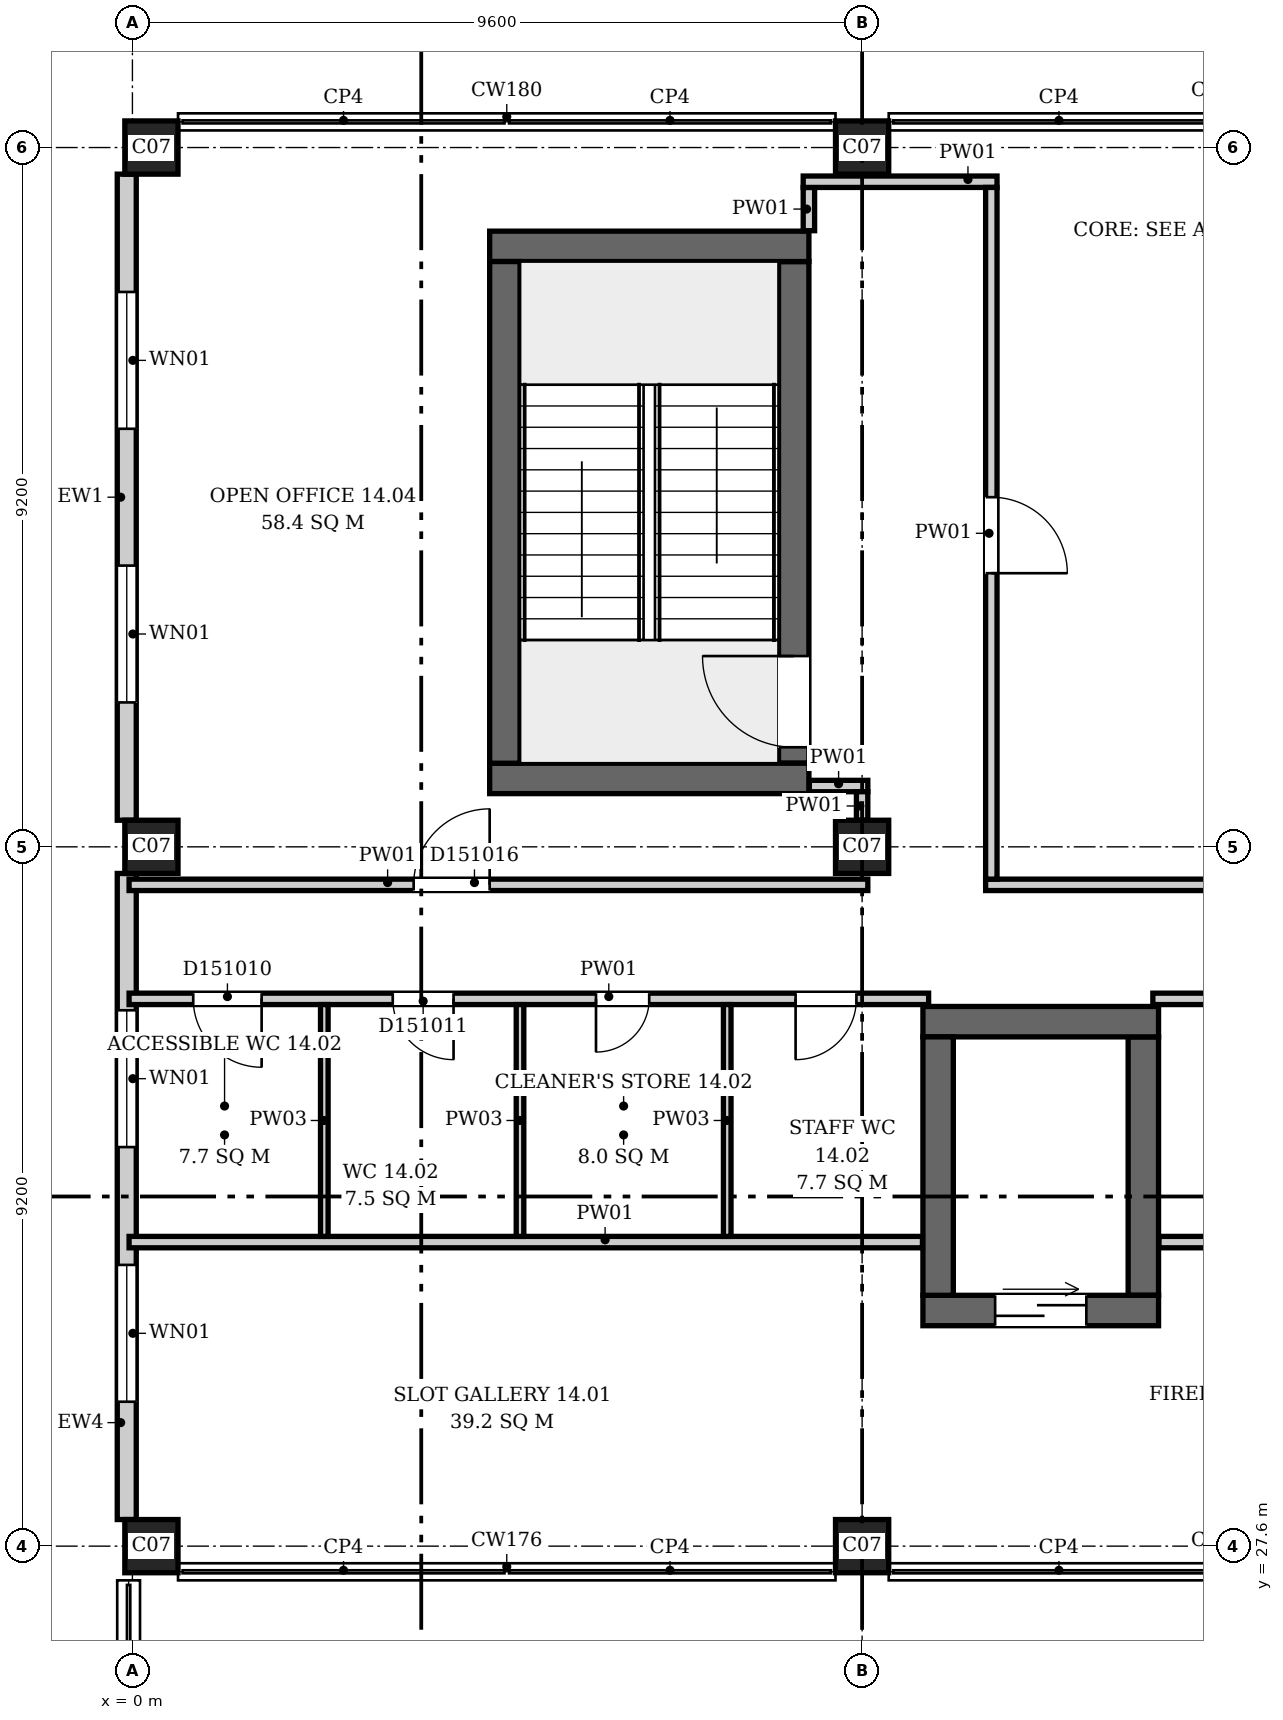
"""IFC4 building model, lengths in metres.
Left out: names, types, materials, properties, quantities, classifications, styles, units other than length and angle.
Written with IfcOpenShell. Run it as: python <this file> out.ifc"""

import sys

from ifc_helpers import new_model, si_unit, direction, frame, frame_2d, origin, origin_2d, place, context, subcontext, project, spatial, rectangle, extrude, element, fill, save


model = new_model("IFC4")
c1 = context("Model", 3, precision=1e-05, world=origin(), true_north=direction((0.0, 1.0)))
c2 = subcontext(c1, "Body", "Model", "MODEL_VIEW")
j1 = project(units=[si_unit("LENGTHUNIT", "METRE"), si_unit("PLANEANGLEUNIT", "RADIAN")], contexts=[c1])
p1 = place(None, origin())
s1 = spatial("IfcSite", under=j1, at=p1, CompositionType="ELEMENT")
p2 = place(p1, origin())
s2 = spatial("IfcBuilding", under=s1, at=p2, CompositionType="ELEMENT")
p3 = place(p2, frame((0.0, 0.0, 69.7)))
s3 = spatial("IfcBuildingStorey", under=s2, at=p3, CompositionType="ELEMENT", Elevation=69.7)
for number, where, z_axis, x_axis in (
    (1, (4.7, 37.7, 0.0), (0.0, 0.0, 1.0), (1.0, 0.0, 0.0)),
    (2, (4.7, 44.7, 0.0), (0.0, 0.0, 1.0), (1.0, 0.0, 0.0)),
):
    element("IfcWall", number, at=place(p3, frame(where, z_axis=z_axis, x_axis=x_axis)), inside=s3, PredefinedType="SHEAR", context=c2, shape_type="SweptSolid", body=[
        extrude(rectangle(XDim=4.2, YDim=0.4, at=frame_2d((2.1, 0.0))), origin(), (0.0, 0.0, 1.0), 4.2),
    ])
p4 = place(p3, frame((4.9, 37.9, 0.0), z_axis=(0.0, 0.0, 1.0), x_axis=(0.0, 1.0, 0.0)))
e3 = element("IfcWall", 3, at=p4, inside=s3, PredefinedType="SHEAR", context=c2, shape_type="SweptSolid", body=[
    extrude(rectangle(XDim=6.6, YDim=0.4, at=frame_2d((3.3, 0.0))), origin(), (0.0, 0.0, 1.0), 4.2),
])
p5 = place(p3, frame((8.7, 37.9, 0.0), z_axis=(0.0, 0.0, 1.0), x_axis=(0.0, 1.0, 0.0)))
e4 = element("IfcWall", 4, at=p5, inside=s3, PredefinedType="SHEAR", context=c2, shape_type="SweptSolid", body=[
    extrude(rectangle(XDim=6.6, YDim=0.4, at=frame_2d((3.3, 0.0))), origin(), (0.0, 0.0, 1.0), 4.2),
])
p6 = place(p5, frame((0.21, 0.0, 0.0)))
e5 = element("IfcOpeningElement", 5, at=p6, cuts=e4, PredefinedType="OPENING", context=c2, shape_type="SweptSolid", body=[
    extrude(rectangle(XDim=1.2, YDim=2.1, at=frame_2d((0.6, 1.05))), frame((0.0, 0.21, 0.0), z_axis=(0.0, -1.0, 0.0), x_axis=(1.0, 0.0, 0.0)), (0.0, 0.0, 1.0), 0.42),
])
p7 = place(p3, frame((10.4, 30.7, 0.0), z_axis=(0.0, 0.0, 1.0), x_axis=(1.0, 0.0, 0.0)))
e6 = element("IfcWall", 6, at=p7, inside=s3, PredefinedType="SHEAR", context=c2, shape_type="SweptSolid", body=[
    extrude(rectangle(XDim=3.1, YDim=0.4, at=frame_2d((1.55, 0.0))), origin(), (0.0, 0.0, 1.0), 4.2),
])
p8 = place(p7, frame((0.95, 0.0, 0.0)))
e7 = element("IfcOpeningElement", 7, at=p8, cuts=e6, PredefinedType="OPENING", context=c2, shape_type="SweptSolid", body=[
    extrude(rectangle(XDim=1.2, YDim=2.1, at=frame_2d((0.6, 1.05))), frame((0.0, 0.21, 0.0), z_axis=(0.0, -1.0, 0.0), x_axis=(1.0, 0.0, 0.0)), (0.0, 0.0, 1.0), 0.42),
])
p9 = place(p3, frame((10.4, 34.5, 0.0), z_axis=(0.0, 0.0, 1.0), x_axis=(1.0, 0.0, 0.0)))
e8 = element("IfcWall", 8, at=p9, inside=s3, PredefinedType="SHEAR", context=c2, shape_type="SweptSolid", body=[
    extrude(rectangle(XDim=3.1, YDim=0.4, at=frame_2d((1.55, 0.0))), origin(), (0.0, 0.0, 1.0), 4.2),
])
for number, where, z_axis, x_axis in (
    (9, (10.6, 30.9, 0.0), (0.0, 0.0, 1.0), (0.0, 1.0, 0.0)),
    (10, (13.3, 30.9, 0.0), (0.0, 0.0, 1.0), (0.0, 1.0, 0.0)),
):
    element("IfcWall", number, at=place(p3, frame(where, z_axis=z_axis, x_axis=x_axis)), inside=s3, PredefinedType="SHEAR", context=c2, shape_type="SweptSolid", body=[
        extrude(rectangle(XDim=3.4, YDim=0.4, at=frame_2d((1.7, 0.0))), origin(), (0.0, 0.0, 1.0), 4.2),
    ])
for number, where, z_axis, x_axis in (
    (11, (0.25, 27.6, 0.0), (0.0, 0.0, 1.0), (1.0, 0.0, 0.0)),
    (12, (9.6, 27.6, 0.0), (0.0, 0.0, 1.0), (1.0, 0.0, 0.0)),
    (13, (0.25, 36.8, 0.0), (0.0, 0.0, 1.0), (1.0, 0.0, 0.0)),
    (14, (9.6, 36.8, 0.0), (0.0, 0.0, 1.0), (1.0, 0.0, 0.0)),
    (15, (0.25, 46.0, 0.0), (0.0, 0.0, 1.0), (1.0, 0.0, 0.0)),
    (16, (9.6, 46.0, 0.0), (0.0, 0.0, 1.0), (1.0, 0.0, 0.0)),
):
    element("IfcColumn", number, at=place(p3, frame(where, z_axis=z_axis, x_axis=x_axis)), inside=s3, PredefinedType="COLUMN", context=c2, shape_type="SweptSolid", body=[
        extrude(rectangle(XDim=0.7, YDim=0.7, at=origin_2d()), origin(), (0.0, 0.0, 1.0), 4.2),
    ])
p10 = place(p3, frame((-0.074, 36.45, 0.0), z_axis=(0.0, 0.0, 1.0), x_axis=(0.0, -1.0, 0.0)))
e17 = element("IfcWall", 17, at=p10, inside=s3, PredefinedType="ELEMENTEDWALL", context=c2, shape_type="SweptSolid", body=[
    extrude(rectangle(XDim=8.5, YDim=0.25, at=frame_2d((4.25, 0.0))), origin(), (0.0, 0.0, 1.0), 3.9),
])
p11 = place(p10, frame((5.15, 0.0, 0.9)))
e18 = element("IfcOpeningElement", 18, at=p11, cuts=e17, PredefinedType="OPENING", context=c2, shape_type="SweptSolid", body=[
    extrude(rectangle(XDim=1.8, YDim=2.6, at=frame_2d((0.9, 1.3))), frame((0.0, 0.135, 0.0), z_axis=(0.0, -1.0, 0.0), x_axis=(1.0, 0.0, 0.0)), (0.0, 0.0, 1.0), 0.27),
])
p12 = place(p10, frame((1.8, 0.0, 0.9)))
e19 = element("IfcOpeningElement", 19, at=p12, cuts=e17, PredefinedType="OPENING", context=c2, shape_type="SweptSolid", body=[
    extrude(rectangle(XDim=1.8, YDim=2.6, at=frame_2d((0.9, 1.3))), frame((0.0, 0.135, 0.0), z_axis=(0.0, -1.0, 0.0), x_axis=(1.0, 0.0, 0.0)), (0.0, 0.0, 1.0), 0.27),
])
p13 = place(p3, frame((-0.074, 45.65, 0.0), z_axis=(0.0, 0.0, 1.0), x_axis=(0.0, -1.0, 0.0)))
e20 = element("IfcWall", 20, at=p13, inside=s3, PredefinedType="ELEMENTEDWALL", context=c2, shape_type="SweptSolid", body=[
    extrude(rectangle(XDim=8.5, YDim=0.25, at=frame_2d((4.25, 0.0))), origin(), (0.0, 0.0, 1.0), 3.9),
])
p14 = place(p13, frame((5.15, 0.0, 0.9)))
e21 = element("IfcOpeningElement", 21, at=p14, cuts=e20, PredefinedType="OPENING", context=c2, shape_type="SweptSolid", body=[
    extrude(rectangle(XDim=1.8, YDim=2.6, at=frame_2d((0.9, 1.3))), frame((0.0, 0.135, 0.0), z_axis=(0.0, -1.0, 0.0), x_axis=(1.0, 0.0, 0.0)), (0.0, 0.0, 1.0), 0.27),
])
p15 = place(p13, frame((1.55, 0.0, 0.9)))
e22 = element("IfcOpeningElement", 22, at=p15, cuts=e20, PredefinedType="OPENING", context=c2, shape_type="SweptSolid", body=[
    extrude(rectangle(XDim=1.8, YDim=2.6, at=frame_2d((0.9, 1.3))), frame((0.0, 0.135, 0.0), z_axis=(0.0, -1.0, 0.0), x_axis=(1.0, 0.0, 0.0)), (0.0, 0.0, 1.0), 0.27),
])
p16 = place(p3, frame((-0.044, 31.6, 0.0), z_axis=(0.0, 0.0, 1.0), x_axis=(1.0, 0.0, 0.0)))
e23 = element("IfcWall", 23, at=p16, inside=s3, PredefinedType="PARTITIONING", context=c2, shape_type="SweptSolid", body=[
    extrude(rectangle(XDim=10.438, YDim=0.15, at=frame_2d((5.219, 0.0))), origin(), (0.0, 0.0, 1.0), 3.9),
])
p17 = place(p3, frame((-0.044, 34.8, 0.0), z_axis=(0.0, 0.0, 1.0), x_axis=(1.0, 0.0, 0.0)))
e24 = element("IfcWall", 24, at=p17, inside=s3, PredefinedType="PARTITIONING", context=c2, shape_type="SweptSolid", body=[
    extrude(rectangle(XDim=10.519, YDim=0.15, at=frame_2d((5.26, 0.0))), origin(), (0.0, 0.0, 1.0), 3.9),
])
p18 = place(p17, frame((0.844, 0.0, 0.0)))
e25 = element("IfcOpeningElement", 25, at=p18, cuts=e24, PredefinedType="OPENING", context=c2, shape_type="SweptSolid", body=[
    extrude(rectangle(XDim=0.9, YDim=2.1, at=frame_2d((0.45, 1.05))), frame((0.0, 0.085, 0.0), z_axis=(0.0, -1.0, 0.0), x_axis=(1.0, 0.0, 0.0)), (0.0, 0.0, 1.0), 0.17),
])
p19 = place(p17, frame((3.469, 0.0, 0.0)))
e26 = element("IfcOpeningElement", 26, at=p19, cuts=e24, PredefinedType="OPENING", context=c2, shape_type="SweptSolid", body=[
    extrude(rectangle(XDim=0.8, YDim=2.1, at=frame_2d((0.4, 1.05))), frame((0.0, 0.085, 0.0), z_axis=(0.0, -1.0, 0.0), x_axis=(1.0, 0.0, 0.0)), (0.0, 0.0, 1.0), 0.17),
])
p20 = place(p17, frame((6.143, 0.0, 0.0)))
e27 = element("IfcOpeningElement", 27, at=p20, cuts=e24, PredefinedType="OPENING", context=c2, shape_type="SweptSolid", body=[
    extrude(rectangle(XDim=0.7, YDim=2.1, at=frame_2d((0.35, 1.05))), frame((0.0, 0.085, 0.0), z_axis=(0.0, -1.0, 0.0), x_axis=(1.0, 0.0, 0.0)), (0.0, 0.0, 1.0), 0.17),
])
p21 = place(p17, frame((8.769, 0.0, 0.0)))
e28 = element("IfcOpeningElement", 28, at=p21, cuts=e24, PredefinedType="OPENING", context=c2, shape_type="SweptSolid", body=[
    extrude(rectangle(XDim=0.8, YDim=2.1, at=frame_2d((0.4, 1.05))), frame((0.0, 0.085, 0.0), z_axis=(0.0, -1.0, 0.0), x_axis=(1.0, 0.0, 0.0)), (0.0, 0.0, 1.0), 0.17),
])
p22 = place(p3, frame((-0.044, 36.3, 0.0), z_axis=(0.0, 0.0, 1.0), x_axis=(1.0, 0.0, 0.0)))
e29 = element("IfcWall", 29, at=p22, inside=s3, PredefinedType="PARTITIONING", context=c2, shape_type="SweptSolid", body=[
    extrude(rectangle(XDim=9.719, YDim=0.15, at=frame_2d((4.859, 0.0))), origin(), (0.0, 0.0, 1.0), 3.9),
])
p23 = place(p22, frame((3.744, 0.0, 0.0)))
e30 = element("IfcOpeningElement", 30, at=p23, cuts=e29, PredefinedType="OPENING", context=c2, shape_type="SweptSolid", body=[
    extrude(rectangle(XDim=1.0, YDim=2.1, at=frame_2d((0.5, 1.05))), frame((0.0, 0.085, 0.0), z_axis=(0.0, -1.0, 0.0), x_axis=(1.0, 0.0, 0.0)), (0.0, 0.0, 1.0), 0.17),
])
for number, where, z_axis, x_axis in (
    (31, (2.525, 31.675, 0.0), (0.0, 0.0, 1.0), (0.0, 1.0, 0.0)),
    (32, (5.099, 31.675, 0.0), (0.0, 0.0, 1.0), (0.0, 1.0, 0.0)),
    (33, (7.825, 31.675, 0.0), (0.0, 0.0, 1.0), (0.0, 1.0, 0.0)),
):
    element("IfcWall", number, at=place(p3, frame(where, z_axis=z_axis, x_axis=x_axis)), inside=s3, PredefinedType="PARTITIONING", context=c2, shape_type="SweptSolid", body=[
        extrude(rectangle(XDim=3.05, YDim=0.1, at=frame_2d((1.525, 0.0))), origin(), (0.0, 0.0, 1.0), 3.9),
    ])
p24 = place(p3, frame((8.9, 44.906, 0.0), z_axis=(0.0, 0.0, 1.0), x_axis=(0.0, 1.0, 0.0)))
e34 = element("IfcWall", 34, at=p24, inside=s3, PredefinedType="PARTITIONING", context=c2, shape_type="SweptSolid", body=[
    extrude(rectangle(XDim=0.569, YDim=0.15, at=frame_2d((0.285, 0.0))), origin(), (0.0, 0.0, 1.0), 3.9),
])
p25 = place(p3, frame((8.825, 45.55, 0.0), z_axis=(0.0, 0.0, 1.0), x_axis=(1.0, 0.0, 0.0)))
e35 = element("IfcWall", 35, at=p25, inside=s3, PredefinedType="PARTITIONING", context=c2, shape_type="SweptSolid", body=[
    extrude(rectangle(XDim=2.55, YDim=0.15, at=frame_2d((1.275, 0.0))), origin(), (0.0, 0.0, 1.0), 3.9),
])
p26 = place(p3, frame((8.906, 37.6, 0.0), z_axis=(0.0, 0.0, 1.0), x_axis=(1.0, 0.0, 0.0)))
e36 = element("IfcWall", 36, at=p26, inside=s3, PredefinedType="PARTITIONING", context=c2, shape_type="SweptSolid", body=[
    extrude(rectangle(XDim=0.769, YDim=0.15, at=frame_2d((0.385, 0.0))), origin(), (0.0, 0.0, 1.0), 3.9),
])
p27 = place(p3, frame((9.6, 37.15, 0.0), z_axis=(0.0, 0.0, 1.0), x_axis=(0.0, 1.0, 0.0)))
e37 = element("IfcWall", 37, at=p27, inside=s3, PredefinedType="PARTITIONING", context=c2, shape_type="SweptSolid", body=[
    extrude(rectangle(XDim=0.375, YDim=0.15, at=frame_2d((0.188, 0.0))), origin(), (0.0, 0.0, 1.0), 3.9),
])
p28 = place(p3, frame((11.225, 36.3, 0.0), z_axis=(0.0, 0.0, 1.0), x_axis=(1.0, 0.0, 0.0)))
e38 = element("IfcWall", 38, at=p28, inside=s3, PredefinedType="PARTITIONING", context=c2, shape_type="SweptSolid", body=[
    extrude(rectangle(XDim=11.05, YDim=0.15, at=frame_2d((5.525, 0.0))), origin(), (0.0, 0.0, 1.0), 3.9),
])
p29 = place(p3, frame((11.3, 36.375, 0.0), z_axis=(0.0, 0.0, 1.0), x_axis=(0.0, 1.0, 0.0)))
e39 = element("IfcWall", 39, at=p29, inside=s3, PredefinedType="PARTITIONING", context=c2, shape_type="SweptSolid", body=[
    extrude(rectangle(XDim=9.1, YDim=0.15, at=frame_2d((4.55, 0.0))), origin(), (0.0, 0.0, 1.0), 3.9),
])
p30 = place(p29, frame((4.025, 0.0, 0.0)))
e40 = element("IfcOpeningElement", 40, at=p30, cuts=e39, PredefinedType="OPENING", context=c2, shape_type="SweptSolid", body=[
    extrude(rectangle(XDim=1.0, YDim=2.1, at=frame_2d((0.5, 1.05))), frame((0.0, 0.085, 0.0), z_axis=(0.0, -1.0, 0.0), x_axis=(1.0, 0.0, 0.0)), (0.0, 0.0, 1.0), 0.17),
])
p31 = place(p3, frame((13.425, 34.8, 0.0), z_axis=(0.0, 0.0, 1.0), x_axis=(1.0, 0.0, 0.0)))
e41 = element("IfcWall", 41, at=p31, inside=s3, PredefinedType="PARTITIONING", context=c2, shape_type="SweptSolid", body=[
    extrude(rectangle(XDim=6.85, YDim=0.15, at=frame_2d((3.425, 0.0))), origin(), (0.0, 0.0, 1.0), 3.9),
])
p32 = place(p31, frame((2.925, 0.0, 0.0)))
e42 = element("IfcOpeningElement", 42, at=p32, cuts=e41, PredefinedType="OPENING", context=c2, shape_type="SweptSolid", body=[
    extrude(rectangle(XDim=1.0, YDim=2.1, at=frame_2d((0.5, 1.05))), frame((0.0, 0.085, 0.0), z_axis=(0.0, -1.0, 0.0), x_axis=(1.0, 0.0, 0.0)), (0.0, 0.0, 1.0), 0.17),
])
p33 = place(p3, frame((13.506, 31.6, 0.0), z_axis=(0.0, 0.0, 1.0), x_axis=(1.0, 0.0, 0.0)))
e43 = element("IfcWall", 43, at=p33, inside=s3, PredefinedType="PARTITIONING", context=c2, shape_type="SweptSolid", body=[
    extrude(rectangle(XDim=6.769, YDim=0.15, at=frame_2d((3.384, 0.0))), origin(), (0.0, 0.0, 1.0), 3.9),
])
p34 = place(p11, origin())
e44 = element("IfcWindow", 44, at=p34, inside=s3, PartitioningType="SINGLE_PANEL", PredefinedType="WINDOW", context=c2, shape_type="SweptSolid", body=[
    extrude(rectangle(XDim=1.8, YDim=2.6, at=frame_2d((0.9, 1.3))), frame((0.0, 0.03, 0.0), z_axis=(0.0, -1.0, 0.0), x_axis=(1.0, 0.0, 0.0)), (0.0, 0.0, 1.0), 0.06),
])
fill(e18, e44)
p35 = place(p12, origin())
e45 = element("IfcWindow", 45, at=p35, inside=s3, PartitioningType="SINGLE_PANEL", PredefinedType="WINDOW", context=c2, shape_type="SweptSolid", body=[
    extrude(rectangle(XDim=1.8, YDim=2.6, at=frame_2d((0.9, 1.3))), frame((0.0, 0.03, 0.0), z_axis=(0.0, -1.0, 0.0), x_axis=(1.0, 0.0, 0.0)), (0.0, 0.0, 1.0), 0.06),
])
fill(e19, e45)
p36 = place(p14, origin())
e46 = element("IfcWindow", 46, at=p36, inside=s3, PartitioningType="SINGLE_PANEL", PredefinedType="WINDOW", context=c2, shape_type="SweptSolid", body=[
    extrude(rectangle(XDim=1.8, YDim=2.6, at=frame_2d((0.9, 1.3))), frame((0.0, 0.03, 0.0), z_axis=(0.0, -1.0, 0.0), x_axis=(1.0, 0.0, 0.0)), (0.0, 0.0, 1.0), 0.06),
])
fill(e21, e46)
p37 = place(p15, origin())
e47 = element("IfcWindow", 47, at=p37, inside=s3, PartitioningType="SINGLE_PANEL", PredefinedType="WINDOW", context=c2, shape_type="SweptSolid", body=[
    extrude(rectangle(XDim=1.8, YDim=2.6, at=frame_2d((0.9, 1.3))), frame((0.0, 0.03, 0.0), z_axis=(0.0, -1.0, 0.0), x_axis=(1.0, 0.0, 0.0)), (0.0, 0.0, 1.0), 0.06),
])
fill(e22, e47)
p38 = place(p6, origin())
e48 = element("IfcDoor", 48, at=p38, inside=s3, OperationType="SINGLE_SWING_RIGHT", PredefinedType="DOOR", context=c2, shape_type="SweptSolid", body=[
    extrude(rectangle(XDim=1.2, YDim=2.1, at=frame_2d((0.6, 1.05))), frame((0.0, 0.025, 0.0), z_axis=(0.0, -1.0, 0.0), x_axis=(1.0, 0.0, 0.0)), (0.0, 0.0, 1.0), 0.05),
])
fill(e5, e48)
p39 = place(p8, origin())
e49 = element("IfcDoor", 49, at=p39, inside=s3, OperationType="DOUBLE_DOOR_SLIDING", PredefinedType="DOOR", context=c2, shape_type="SweptSolid", body=[
    extrude(rectangle(XDim=1.2, YDim=2.1, at=frame_2d((0.6, 1.05))), frame((0.0, 0.025, 0.0), z_axis=(0.0, -1.0, 0.0), x_axis=(1.0, 0.0, 0.0)), (0.0, 0.0, 1.0), 0.05),
])
fill(e7, e49)
p40 = place(p18, origin())
e50 = element("IfcDoor", 50, at=p40, inside=s3, OperationType="SINGLE_SWING_RIGHT", PredefinedType="DOOR", context=c2, shape_type="SweptSolid", body=[
    extrude(rectangle(XDim=0.9, YDim=2.1, at=frame_2d((0.45, 1.05))), frame((0.0, 0.025, 0.0), z_axis=(0.0, -1.0, 0.0), x_axis=(1.0, 0.0, 0.0)), (0.0, 0.0, 1.0), 0.05),
])
fill(e25, e50)
p41 = place(p19, origin())
e51 = element("IfcDoor", 51, at=p41, inside=s3, OperationType="SINGLE_SWING_RIGHT", PredefinedType="DOOR", context=c2, shape_type="SweptSolid", body=[
    extrude(rectangle(XDim=0.8, YDim=2.1, at=frame_2d((0.4, 1.05))), frame((0.0, 0.025, 0.0), z_axis=(0.0, -1.0, 0.0), x_axis=(1.0, 0.0, 0.0)), (0.0, 0.0, 1.0), 0.05),
])
fill(e26, e51)
p42 = place(p20, origin())
e52 = element("IfcDoor", 52, at=p42, inside=s3, OperationType="SINGLE_SWING_LEFT", PredefinedType="DOOR", context=c2, shape_type="SweptSolid", body=[
    extrude(rectangle(XDim=0.7, YDim=2.1, at=frame_2d((0.35, 1.05))), frame((0.0, 0.025, 0.0), z_axis=(0.0, -1.0, 0.0), x_axis=(1.0, 0.0, 0.0)), (0.0, 0.0, 1.0), 0.05),
])
fill(e27, e52)
p43 = place(p21, origin())
e53 = element("IfcDoor", 53, at=p43, inside=s3, OperationType="SINGLE_SWING_LEFT", PredefinedType="DOOR", context=c2, shape_type="SweptSolid", body=[
    extrude(rectangle(XDim=0.8, YDim=2.1, at=frame_2d((0.4, 1.05))), frame((0.0, 0.025, 0.0), z_axis=(0.0, -1.0, 0.0), x_axis=(1.0, 0.0, 0.0)), (0.0, 0.0, 1.0), 0.05),
])
fill(e28, e53)
p44 = place(p23, origin())
e54 = element("IfcDoor", 54, at=p44, inside=s3, OperationType="SINGLE_SWING_RIGHT", PredefinedType="DOOR", context=c2, shape_type="SweptSolid", body=[
    extrude(rectangle(XDim=1.0, YDim=2.1, at=frame_2d((0.5, 1.05))), frame((0.0, 0.025, 0.0), z_axis=(0.0, -1.0, 0.0), x_axis=(1.0, 0.0, 0.0)), (0.0, 0.0, 1.0), 0.05),
])
fill(e30, e54)
p45 = place(p30, origin())
e55 = element("IfcDoor", 55, at=p45, inside=s3, OperationType="SINGLE_SWING_LEFT", PredefinedType="DOOR", context=c2, shape_type="SweptSolid", body=[
    extrude(rectangle(XDim=1.0, YDim=2.1, at=frame_2d((0.5, 1.05))), frame((0.0, 0.025, 0.0), z_axis=(0.0, -1.0, 0.0), x_axis=(1.0, 0.0, 0.0)), (0.0, 0.0, 1.0), 0.05),
])
fill(e40, e55)
save(model, sys.argv[1])
